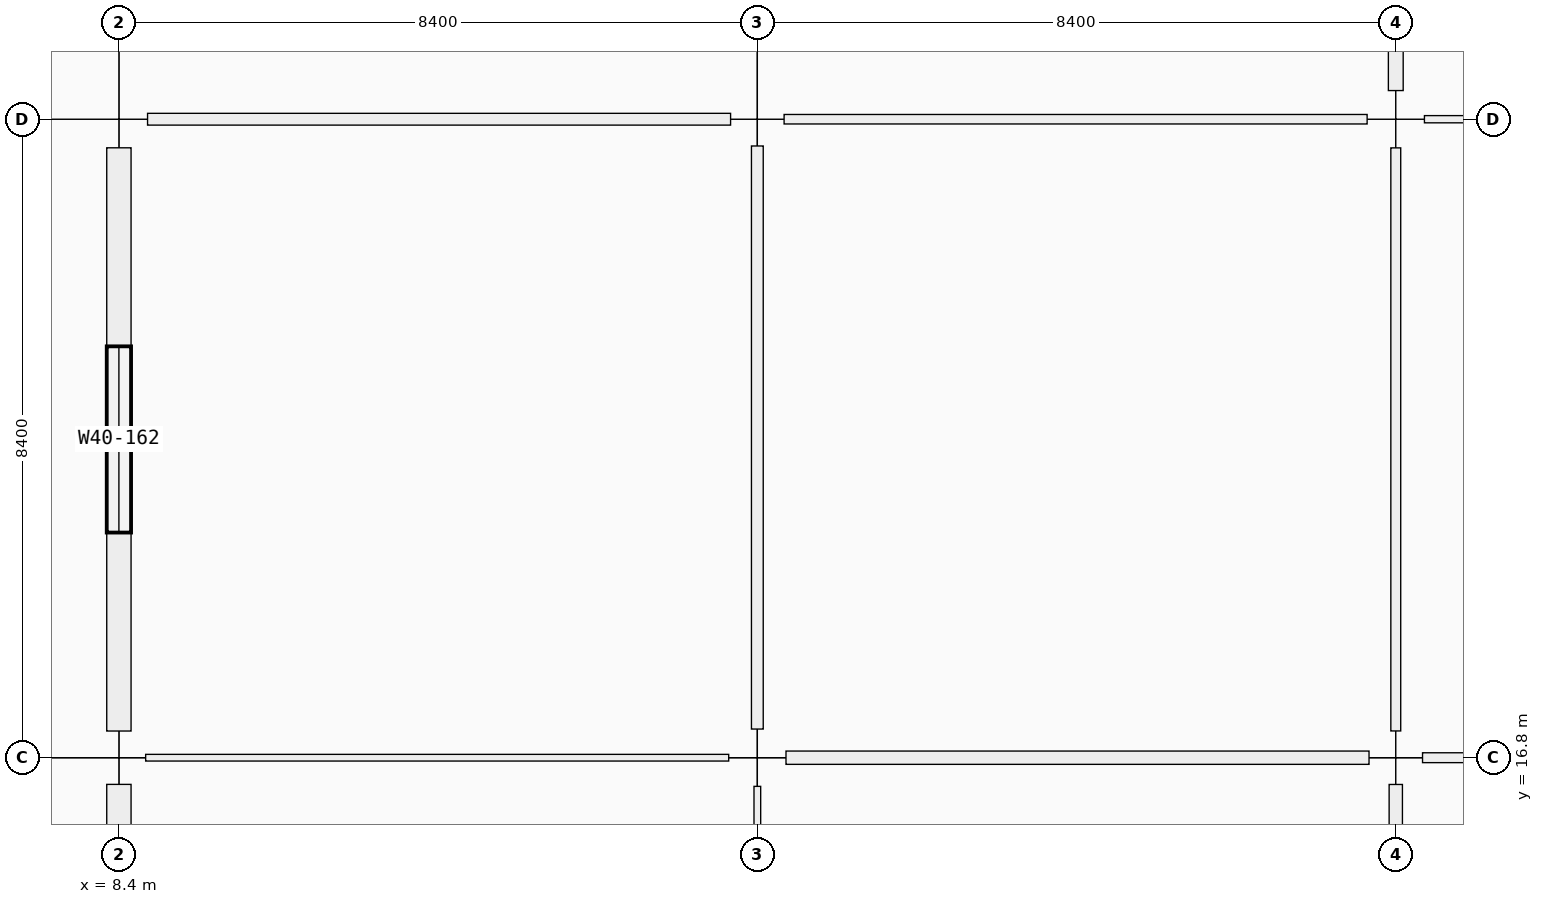
"""IFC4 building model, lengths in metres.
Left out: names, types, materials, properties, quantities, classifications, styles, units other than length and angle.
Written with IfcOpenShell. Run it as: python <this file> out.ifc"""

import sys

from ifc_helpers import new_model, si_unit, direction, frame, frame_2d, origin, origin_2d, place, context, subcontext, project, spatial, rectangle, extrude, element, fill, save


model = new_model("IFC4")
c1 = context("Model", 3, precision=1e-05, world=origin(), true_north=direction((0.0, 1.0)))
c2 = subcontext(c1, "Body", "Model", "MODEL_VIEW")
j1 = project(units=[si_unit("LENGTHUNIT", "METRE"), si_unit("PLANEANGLEUNIT", "RADIAN")], contexts=[c1])
p1 = place(None, origin())
s1 = spatial("IfcSite", under=j1, at=p1, CompositionType="ELEMENT")
p2 = place(p1, origin())
s2 = spatial("IfcBuilding", under=s1, at=p2, CompositionType="ELEMENT")
p3 = place(p2, frame((0.0, 0.0, 10.26)))
s3 = spatial("IfcBuildingStorey", under=s2, at=p3, CompositionType="ELEMENT", Elevation=10.26)
p4 = place(p3, frame((8.4, 16.8, 0.0), z_axis=(0.0, 0.0, 1.0), x_axis=(1.0, 0.0, 0.0)))
e1 = element("IfcColumn", 1, at=p4, inside=s3, PredefinedType="COLUMN", context=c2, shape_type="SweptSolid", body=[
    extrude(rectangle(XDim=0.7, YDim=0.7, at=origin_2d()), origin(), (0.0, 0.0, 1.0), 4.5),
])
for number, where, z_axis, x_axis in (
    (2, (8.4, 25.2, 0.0), (0.0, 0.0, 1.0), (1.0, 0.0, 0.0)),
    (3, (16.8, 16.8, 0.0), (0.0, 0.0, 1.0), (1.0, 0.0, 0.0)),
):
    element("IfcColumn", number, at=place(p3, frame(where, z_axis=z_axis, x_axis=x_axis)), inside=s3, PredefinedType="COLUMN", context=c2, shape_type="SweptSolid", body=[
        extrude(rectangle(XDim=0.75, YDim=0.75, at=origin_2d()), origin(), (0.0, 0.0, 1.0), 4.5),
    ])
for number, where, z_axis, x_axis in (
    (4, (16.8, 25.2, 0.0), (0.0, 0.0, 1.0), (1.0, 0.0, 0.0)),
    (5, (25.2, 16.8, 0.0), (0.0, 0.0, 1.0), (1.0, 0.0, 0.0)),
):
    element("IfcColumn", number, at=place(p3, frame(where, z_axis=z_axis, x_axis=x_axis)), inside=s3, PredefinedType="COLUMN", context=c2, shape_type="SweptSolid", body=[
        extrude(rectangle(XDim=0.7, YDim=0.7, at=origin_2d()), origin(), (0.0, 0.0, 1.0), 4.5),
    ])
p5 = place(p3, frame((25.2, 25.2, 0.0), z_axis=(0.0, 0.0, 1.0), x_axis=(1.0, 0.0, 0.0)))
e6 = element("IfcColumn", 6, at=p5, inside=s3, PredefinedType="COLUMN", context=c2, shape_type="SweptSolid", body=[
    extrude(rectangle(XDim=0.75, YDim=0.75, at=origin_2d()), origin(), (0.0, 0.0, 1.0), 4.5),
])
p6 = place(p3, frame((8.4, 8.676, 0.0), z_axis=(0.0, 0.0, 1.0), x_axis=(0.0, 1.0, 0.0)))
e7 = element("IfcWall", 7, at=p6, inside=s3, PredefinedType="SOLIDWALL", context=c2, shape_type="SweptSolid", body=[
    extrude(rectangle(XDim=7.773, YDim=0.32, at=frame_2d((3.886, 0.0))), origin(), (0.0, 0.0, 1.0), 3.54),
])
p7 = place(p6, frame((2.861, 0.0, 0.9)))
e8 = element("IfcOpeningElement", 8, at=p7, cuts=e7, PredefinedType="OPENING", context=c2, shape_type="SweptSolid", body=[
    extrude(rectangle(XDim=2.05, YDim=1.45, at=frame_2d((1.025, 0.725))), frame((0.0, 0.16, 0.0), z_axis=(0.0, -1.0, 0.0), x_axis=(1.0, 0.0, 0.0)), (0.0, 0.0, 1.0), 0.32),
])
p8 = place(p3, frame((8.4, 17.151, 0.0), z_axis=(0.0, 0.0, 1.0), x_axis=(0.0, 1.0, 0.0)))
e9 = element("IfcWall", 9, at=p8, inside=s3, PredefinedType="SOLIDWALL", context=c2, shape_type="SweptSolid", body=[
    extrude(rectangle(XDim=7.673, YDim=0.32, at=frame_2d((3.836, 0.0))), origin(), (0.0, 0.0, 1.0), 3.54),
])
p9 = place(p8, frame((2.611, 0.0, 0.9)))
e10 = element("IfcOpeningElement", 10, at=p9, cuts=e9, PredefinedType="OPENING", context=c2, shape_type="SweptSolid", body=[
    extrude(rectangle(XDim=2.45, YDim=1.45, at=frame_2d((1.225, 0.725))), frame((0.0, 0.16, 0.0), z_axis=(0.0, -1.0, 0.0), x_axis=(1.0, 0.0, 0.0)), (0.0, 0.0, 1.0), 0.32),
])
p10 = place(p3, frame((8.752, 16.8, 0.0), z_axis=(0.0, 0.0, 1.0), x_axis=(1.0, 0.0, 0.0)))
e11 = element("IfcWall", 11, at=p10, inside=s3, PredefinedType="PARTITIONING", context=c2, shape_type="SweptSolid", body=[
    extrude(rectangle(XDim=7.671, YDim=0.088, at=frame_2d((3.835, 0.0))), origin(), (0.0, 0.0, 1.0), 3.37),
])
p11 = place(p10, frame((3.351, 0.0, 0.0)))
e12 = element("IfcOpeningElement", 12, at=p11, cuts=e11, PredefinedType="OPENING", context=c2, shape_type="SweptSolid", body=[
    extrude(rectangle(XDim=0.97, YDim=2.12, at=frame_2d((0.485, 1.06))), frame((0.0, 0.044, 0.0), z_axis=(0.0, -1.0, 0.0), x_axis=(1.0, 0.0, 0.0)), (0.0, 0.0, 1.0), 0.088),
])
p12 = place(p3, frame((8.777, 25.2, 0.0), z_axis=(0.0, 0.0, 1.0), x_axis=(1.0, 0.0, 0.0)))
e13 = element("IfcWall", 13, at=p12, inside=s3, PredefinedType="PARTITIONING", context=c2, shape_type="SweptSolid", body=[
    extrude(rectangle(XDim=7.671, YDim=0.155, at=frame_2d((3.835, 0.0))), origin(), (0.0, 0.0, 1.0), 3.37),
])
p13 = place(p12, frame((3.371, 0.0, 0.0)))
e14 = element("IfcOpeningElement", 14, at=p13, cuts=e13, PredefinedType="OPENING", context=c2, shape_type="SweptSolid", body=[
    extrude(rectangle(XDim=0.93, YDim=2.12, at=frame_2d((0.465, 1.06))), frame((0.0, 0.078, 0.0), z_axis=(0.0, -1.0, 0.0), x_axis=(1.0, 0.0, 0.0)), (0.0, 0.0, 1.0), 0.155),
])
p14 = place(p3, frame((17.177, 16.8, 0.0), z_axis=(0.0, 0.0, 1.0), x_axis=(1.0, 0.0, 0.0)))
e15 = element("IfcWall", 15, at=p14, inside=s3, PredefinedType="PARTITIONING", context=c2, shape_type="SweptSolid", body=[
    extrude(rectangle(XDim=7.671, YDim=0.175, at=frame_2d((3.835, 0.0))), origin(), (0.0, 0.0, 1.0), 3.37),
])
p15 = place(p14, frame((3.371, 0.0, 0.0)))
e16 = element("IfcOpeningElement", 16, at=p15, cuts=e15, PredefinedType="OPENING", context=c2, shape_type="SweptSolid", body=[
    extrude(rectangle(XDim=0.93, YDim=2.12, at=frame_2d((0.465, 1.06))), frame((0.0, 0.087, 0.0), z_axis=(0.0, -1.0, 0.0), x_axis=(1.0, 0.0, 0.0)), (0.0, 0.0, 1.0), 0.175),
])
p16 = place(p3, frame((17.152, 25.2, 0.0), z_axis=(0.0, 0.0, 1.0), x_axis=(1.0, 0.0, 0.0)))
e17 = element("IfcWall", 17, at=p16, inside=s3, PredefinedType="PARTITIONING", context=c2, shape_type="SweptSolid", body=[
    extrude(rectangle(XDim=7.671, YDim=0.125, at=frame_2d((3.835, 0.0))), origin(), (0.0, 0.0, 1.0), 3.37),
])
p17 = place(p16, frame((3.306, 0.0, 0.0)))
e18 = element("IfcOpeningElement", 18, at=p17, cuts=e17, PredefinedType="OPENING", context=c2, shape_type="SweptSolid", body=[
    extrude(rectangle(XDim=1.06, YDim=2.25, at=frame_2d((0.53, 1.125))), frame((0.0, 0.062, 0.0), z_axis=(0.0, -1.0, 0.0), x_axis=(1.0, 0.0, 0.0)), (0.0, 0.0, 1.0), 0.125),
])
p18 = place(p3, frame((25.552, 16.8, 0.0), z_axis=(0.0, 0.0, 1.0), x_axis=(1.0, 0.0, 0.0)))
e19 = element("IfcWall", 19, at=p18, inside=s3, PredefinedType="MOVABLE", context=c2, shape_type="SweptSolid", body=[
    extrude(rectangle(XDim=7.671, YDim=0.13, at=frame_2d((3.835, 0.0))), origin(), (0.0, 0.0, 1.0), 3.37),
])
p19 = place(p18, frame((3.296, 0.0, 0.0)))
e20 = element("IfcOpeningElement", 20, at=p19, cuts=e19, PredefinedType="OPENING", context=c2, shape_type="SweptSolid", body=[
    extrude(rectangle(XDim=1.08, YDim=2.25, at=frame_2d((0.54, 1.125))), frame((0.0, 0.065, 0.0), z_axis=(0.0, -1.0, 0.0), x_axis=(1.0, 0.0, 0.0)), (0.0, 0.0, 1.0), 0.13),
])
p20 = place(p3, frame((25.577, 25.2, 0.0), z_axis=(0.0, 0.0, 1.0), x_axis=(1.0, 0.0, 0.0)))
e21 = element("IfcWall", 21, at=p20, inside=s3, PredefinedType="PARTITIONING", context=c2, shape_type="SweptSolid", body=[
    extrude(rectangle(XDim=7.671, YDim=0.095, at=frame_2d((3.835, 0.0))), origin(), (0.0, 0.0, 1.0), 3.37),
])
p21 = place(p20, frame((3.325, 0.0, 0.0)))
e22 = element("IfcOpeningElement", 22, at=p21, cuts=e21, PredefinedType="OPENING", context=c2, shape_type="SweptSolid", body=[
    extrude(rectangle(XDim=1.02, YDim=2.2, at=frame_2d((0.51, 1.1))), frame((0.0, 0.047, 0.0), z_axis=(0.0, -1.0, 0.0), x_axis=(1.0, 0.0, 0.0)), (0.0, 0.0, 1.0), 0.095),
])
p22 = place(p3, frame((16.8, 8.677, 0.0), z_axis=(0.0, 0.0, 1.0), x_axis=(0.0, 1.0, 0.0)))
e23 = element("IfcWall", 23, at=p22, inside=s3, PredefinedType="PARTITIONING", context=c2, shape_type="SweptSolid", body=[
    extrude(rectangle(XDim=7.746, YDim=0.088, at=frame_2d((3.873, 0.0))), origin(), (0.0, 0.0, 1.0), 3.37),
])
p23 = place(p22, frame((3.353, 0.0, 0.0)))
e24 = element("IfcOpeningElement", 24, at=p23, cuts=e23, PredefinedType="OPENING", context=c2, shape_type="SweptSolid", body=[
    extrude(rectangle(XDim=1.04, YDim=2.2, at=frame_2d((0.52, 1.1))), frame((0.0, 0.044, 0.0), z_axis=(0.0, -1.0, 0.0), x_axis=(1.0, 0.0, 0.0)), (0.0, 0.0, 1.0), 0.088),
])
p24 = place(p3, frame((16.8, 17.177, 0.0), z_axis=(0.0, 0.0, 1.0), x_axis=(0.0, 1.0, 0.0)))
e25 = element("IfcWall", 25, at=p24, inside=s3, PredefinedType="PARTITIONING", context=c2, shape_type="SweptSolid", body=[
    extrude(rectangle(XDim=7.671, YDim=0.155, at=frame_2d((3.835, 0.0))), origin(), (0.0, 0.0, 1.0), 3.37),
])
p25 = place(p24, frame((3.325, 0.0, 0.0)))
e26 = element("IfcOpeningElement", 26, at=p25, cuts=e25, PredefinedType="OPENING", context=c2, shape_type="SweptSolid", body=[
    extrude(rectangle(XDim=1.02, YDim=2.2, at=frame_2d((0.51, 1.1))), frame((0.0, 0.078, 0.0), z_axis=(0.0, -1.0, 0.0), x_axis=(1.0, 0.0, 0.0)), (0.0, 0.0, 1.0), 0.155),
])
p26 = place(p3, frame((25.2, 8.677, 0.0), z_axis=(0.0, 0.0, 1.0), x_axis=(0.0, 1.0, 0.0)))
e27 = element("IfcWall", 27, at=p26, inside=s3, PredefinedType="PARTITIONING", context=c2, shape_type="SweptSolid", body=[
    extrude(rectangle(XDim=7.771, YDim=0.175, at=frame_2d((3.885, 0.0))), origin(), (0.0, 0.0, 1.0), 3.37),
])
p27 = place(p26, frame((3.385, 0.0, 0.0)))
e28 = element("IfcOpeningElement", 28, at=p27, cuts=e27, PredefinedType="OPENING", context=c2, shape_type="SweptSolid", body=[
    extrude(rectangle(XDim=1.0, YDim=2.2, at=frame_2d((0.5, 1.1))), frame((0.0, 0.087, 0.0), z_axis=(0.0, -1.0, 0.0), x_axis=(1.0, 0.0, 0.0)), (0.0, 0.0, 1.0), 0.175),
])
p28 = place(p3, frame((25.2, 17.152, 0.0), z_axis=(0.0, 0.0, 1.0), x_axis=(0.0, 1.0, 0.0)))
e29 = element("IfcWall", 29, at=p28, inside=s3, PredefinedType="MOVABLE", context=c2, shape_type="SweptSolid", body=[
    extrude(rectangle(XDim=7.671, YDim=0.13, at=frame_2d((3.835, 0.0))), origin(), (0.0, 0.0, 1.0), 3.37),
])
p29 = place(p28, frame((3.346, 0.0, 0.0)))
e30 = element("IfcOpeningElement", 30, at=p29, cuts=e29, PredefinedType="OPENING", context=c2, shape_type="SweptSolid", body=[
    extrude(rectangle(XDim=0.98, YDim=2.18, at=frame_2d((0.49, 1.09))), frame((0.0, 0.065, 0.0), z_axis=(0.0, -1.0, 0.0), x_axis=(1.0, 0.0, 0.0)), (0.0, 0.0, 1.0), 0.13),
])
p30 = place(p3, frame((25.2, 25.577, 0.0), z_axis=(0.0, 0.0, 1.0), x_axis=(0.0, 1.0, 0.0)))
e31 = element("IfcWall", 31, at=p30, inside=s3, PredefinedType="PARTITIONING", context=c2, shape_type="SweptSolid", body=[
    extrude(rectangle(XDim=7.671, YDim=0.195, at=frame_2d((3.835, 0.0))), origin(), (0.0, 0.0, 1.0), 3.37),
])
p31 = place(p30, frame((3.371, 0.0, 0.0)))
e32 = element("IfcOpeningElement", 32, at=p31, cuts=e31, PredefinedType="OPENING", context=c2, shape_type="SweptSolid", body=[
    extrude(rectangle(XDim=0.93, YDim=2.12, at=frame_2d((0.465, 1.06))), frame((0.0, 0.098, 0.0), z_axis=(0.0, -1.0, 0.0), x_axis=(1.0, 0.0, 0.0)), (0.0, 0.0, 1.0), 0.195),
])
p32 = place(p9, origin())
e33 = element("IfcWindow", 33, at=p32, inside=s3, PartitioningType="SINGLE_PANEL", PredefinedType="WINDOW", context=c2, shape_type="SweptSolid", body=[
    extrude(rectangle(XDim=2.45, YDim=1.45, at=frame_2d((1.225, 0.725))), frame((0.0, 0.03, 0.0), z_axis=(0.0, -1.0, 0.0), x_axis=(1.0, 0.0, 0.0)), (0.0, 0.0, 1.0), 0.06),
])
fill(e10, e33)
p33 = place(p13, origin())
e34 = element("IfcDoor", 34, at=p33, inside=s3, OperationType="SINGLE_SWING_RIGHT", PredefinedType="DOOR", context=c2, shape_type="SweptSolid", body=[
    extrude(rectangle(XDim=0.93, YDim=2.12, at=frame_2d((0.465, 1.06))), frame((0.0, 0.025, 0.0), z_axis=(0.0, -1.0, 0.0), x_axis=(1.0, 0.0, 0.0)), (0.0, 0.0, 1.0), 0.05),
])
fill(e14, e34)
p34 = place(p17, origin())
e35 = element("IfcDoor", 35, at=p34, inside=s3, OperationType="SINGLE_SWING_RIGHT", PredefinedType="DOOR", context=c2, shape_type="SweptSolid", body=[
    extrude(rectangle(XDim=1.06, YDim=2.25, at=frame_2d((0.53, 1.125))), frame((0.0, 0.025, 0.0), z_axis=(0.0, -1.0, 0.0), x_axis=(1.0, 0.0, 0.0)), (0.0, 0.0, 1.0), 0.05),
])
fill(e18, e35)
p35 = place(p11, origin())
e36 = element("IfcDoor", 36, at=p35, inside=s3, OperationType="SINGLE_SWING_RIGHT", PredefinedType="DOOR", context=c2, shape_type="SweptSolid", body=[
    extrude(rectangle(XDim=0.97, YDim=2.12, at=frame_2d((0.485, 1.06))), frame((0.0, 0.025, 0.0), z_axis=(0.0, -1.0, 0.0), x_axis=(1.0, 0.0, 0.0)), (0.0, 0.0, 1.0), 0.05),
])
fill(e12, e36)
p36 = place(p15, origin())
e37 = element("IfcDoor", 37, at=p36, inside=s3, OperationType="SINGLE_SWING_LEFT", PredefinedType="DOOR", context=c2, shape_type="SweptSolid", body=[
    extrude(rectangle(XDim=0.93, YDim=2.12, at=frame_2d((0.465, 1.06))), frame((0.0, 0.025, 0.0), z_axis=(0.0, -1.0, 0.0), x_axis=(1.0, 0.0, 0.0)), (0.0, 0.0, 1.0), 0.05),
])
fill(e16, e37)
p37 = place(p25, origin())
e38 = element("IfcDoor", 38, at=p37, inside=s3, OperationType="SINGLE_SWING_LEFT", PredefinedType="DOOR", context=c2, shape_type="SweptSolid", body=[
    extrude(rectangle(XDim=1.02, YDim=2.2, at=frame_2d((0.51, 1.1))), frame((0.0, 0.025, 0.0), z_axis=(0.0, -1.0, 0.0), x_axis=(1.0, 0.0, 0.0)), (0.0, 0.0, 1.0), 0.05),
])
fill(e26, e38)
p38 = place(p29, origin())
e39 = element("IfcDoor", 39, at=p38, inside=s3, OperationType="SINGLE_SWING_LEFT", PredefinedType="DOOR", context=c2, shape_type="SweptSolid", body=[
    extrude(rectangle(XDim=0.98, YDim=2.18, at=frame_2d((0.49, 1.09))), frame((0.0, 0.025, 0.0), z_axis=(0.0, -1.0, 0.0), x_axis=(1.0, 0.0, 0.0)), (0.0, 0.0, 1.0), 0.05),
])
fill(e30, e39)
save(model, sys.argv[1])
